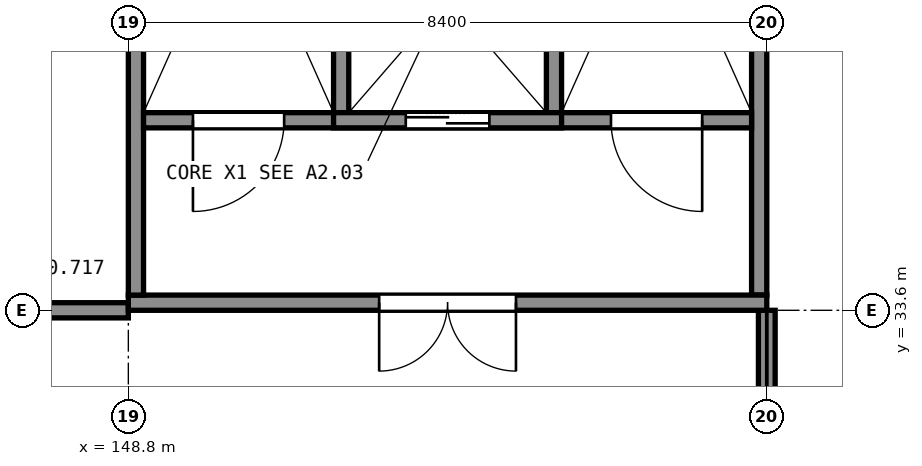
"""IFC4 building model, lengths in metres.
Left out: names, types, materials, properties, quantities, classifications, styles, units other than length and angle.
Written with IfcOpenShell. Run it as: python <this file> out.ifc"""

import sys

from ifc_helpers import new_model, si_unit, direction, frame, frame_2d, origin, place, context, subcontext, project, spatial, polyline, rectangle, outline, extrude, element, fill, save


model = new_model("IFC4")
c1 = context("Model", 3, precision=1e-05, world=origin(), true_north=direction((0.0, 1.0)))
c2 = subcontext(c1, "Body", "Model", "MODEL_VIEW")
j1 = project(units=[si_unit("LENGTHUNIT", "METRE"), si_unit("PLANEANGLEUNIT", "RADIAN")], contexts=[c1])
p1 = place(None, origin())
s1 = spatial("IfcSite", under=j1, at=p1, CompositionType="ELEMENT")
p2 = place(p1, origin())
s2 = spatial("IfcBuilding", under=s1, at=p2, CompositionType="ELEMENT")
p3 = place(p2, frame((0.0, 0.0, 25.0)))
s3 = spatial("IfcBuildingStorey", under=s2, at=p3, CompositionType="ELEMENT", Elevation=25.0)
p4 = place(p3, frame((148.8, 33.7, 0.0), z_axis=(0.0, 0.0, 1.0), x_axis=(1.0, 0.0, 0.0)))
e1 = element("IfcWall", 1, at=p4, inside=s3, PredefinedType="SHEAR", context=c2, shape_type="SweptSolid", body=[
    extrude(outline(polyline([(0.0, 0.0), (8.4, 0.0), (8.4, 4.4), (7.8, 4.528), (7.5, 4.591), (6.6, 4.783), (6.3, 4.846), (5.4, 5.038), (5.1, 5.101), (3.9, 5.357), (3.6, 5.42), (2.7, 5.612), (2.4, 5.675), (1.5, 5.867), (1.2, 5.93), (0.3, 6.122), (0.0, 6.185), (0.0, 0.0)])), frame((0.0, 0.1, 0.0), z_axis=(0.0, -1.0, 0.0), x_axis=(1.0, 0.0, 0.0)), (0.0, 0.0, 1.0), 0.2),
])
p5 = place(p4, frame((3.3, 0.0, 0.0)))
e2 = element("IfcOpeningElement", 2, at=p5, cuts=e1, PredefinedType="OPENING", context=c2, shape_type="SweptSolid", body=[
    extrude(rectangle(XDim=1.8, YDim=2.1, at=frame_2d((0.9, 1.05))), frame((0.0, 0.11, 0.0), z_axis=(0.0, -1.0, 0.0), x_axis=(1.0, 0.0, 0.0)), (0.0, 0.0, 1.0), 0.22),
])
p6 = place(p3, frame((148.9, 33.8, 0.0), z_axis=(0.0, 0.0, 1.0), x_axis=(0.0, 1.0, 0.0)))
e3 = element("IfcWall", 3, at=p6, inside=s3, PredefinedType="SHEAR", context=c2, shape_type="SweptSolid", body=[
    extrude(rectangle(XDim=8.0, YDim=0.2, at=frame_2d((4.0, 0.0))), origin(), (0.0, 0.0, 1.0), 6.165),
])
p7 = place(p3, frame((157.1, 33.8, 0.0), z_axis=(0.0, 0.0, 1.0), x_axis=(0.0, 1.0, 0.0)))
e4 = element("IfcWall", 4, at=p7, inside=s3, PredefinedType="SHEAR", context=c2, shape_type="SweptSolid", body=[
    extrude(rectangle(XDim=8.0, YDim=0.2, at=frame_2d((4.0, 0.0))), origin(), (0.0, 0.0, 1.0), 4.42),
])
p8 = place(p3, frame((149.0, 36.1, 0.0), z_axis=(0.0, 0.0, 1.0), x_axis=(1.0, 0.0, 0.0)))
e5 = element("IfcWall", 5, at=p8, inside=s3, PredefinedType="SHEAR", context=c2, shape_type="SweptSolid", body=[
    extrude(outline(polyline([(0.0, 0.0), (8.0, 0.0), (8.0, 4.443), (7.704, 4.505), (0.0, 6.143), (0.0, 0.0)])), frame((0.0, 0.1, 0.0), z_axis=(0.0, -1.0, 0.0), x_axis=(1.0, 0.0, 0.0)), (0.0, 0.0, 1.0), 0.2),
])
p9 = place(p8, frame((0.65, 0.0, 0.0)))
e6 = element("IfcOpeningElement", 6, at=p9, cuts=e5, PredefinedType="OPENING", context=c2, shape_type="SweptSolid", body=[
    extrude(rectangle(XDim=1.2, YDim=2.1, at=frame_2d((0.6, 1.05))), frame((0.0, 0.11, 0.0), z_axis=(0.0, -1.0, 0.0), x_axis=(1.0, 0.0, 0.0)), (0.0, 0.0, 1.0), 0.22),
])
p10 = place(p8, frame((6.15, 0.0, 0.0)))
e7 = element("IfcOpeningElement", 7, at=p10, cuts=e5, PredefinedType="OPENING", context=c2, shape_type="SweptSolid", body=[
    extrude(rectangle(XDim=1.2, YDim=2.1, at=frame_2d((0.6, 1.05))), frame((0.0, 0.11, 0.0), z_axis=(0.0, -1.0, 0.0), x_axis=(1.0, 0.0, 0.0)), (0.0, 0.0, 1.0), 0.22),
])
p11 = place(p8, frame((3.45, 0.0, 0.0)))
e8 = element("IfcOpeningElement", 8, at=p11, cuts=e5, PredefinedType="OPENING", context=c2, shape_type="SweptSolid", body=[
    extrude(rectangle(XDim=1.1, YDim=2.1, at=frame_2d((0.55, 1.05))), frame((0.0, 0.11, 0.0), z_axis=(0.0, -1.0, 0.0), x_axis=(1.0, 0.0, 0.0)), (0.0, 0.0, 1.0), 0.22),
])
p12 = place(p3, frame((151.6, 36.2, 0.0), z_axis=(0.0, 0.0, 1.0), x_axis=(0.0, 1.0, 0.0)))
e9 = element("IfcWall", 9, at=p12, inside=s3, PredefinedType="SHEAR", context=c2, shape_type="SweptSolid", body=[
    extrude(rectangle(XDim=5.6, YDim=0.2, at=frame_2d((2.8, 0.0))), origin(), (0.0, 0.0, 1.0), 5.59),
])
p13 = place(p3, frame((154.4, 36.2, 0.0), z_axis=(0.0, 0.0, 1.0), x_axis=(0.0, 1.0, 0.0)))
e10 = element("IfcWall", 10, at=p13, inside=s3, PredefinedType="SHEAR", context=c2, shape_type="SweptSolid", body=[
    extrude(rectangle(XDim=5.6, YDim=0.2, at=frame_2d((2.8, 0.0))), origin(), (0.0, 0.0, 1.0), 4.995),
])
p14 = place(p3, frame((151.5, 36.1, 4.975), z_axis=(0.0, 0.0, 1.0), x_axis=(1.0, 0.0, 0.0)))
e11 = element("IfcWall", 11, at=p14, inside=s3, PredefinedType="SOLIDWALL", context=c2, shape_type="SweptSolid", body=[
    extrude(outline(polyline([(0.0, 0.636), (3.0, -0.001), (3.0, 3.438), (0.0, 3.438), (0.0, 0.636)])), frame((0.0, 0.1, 0.0), z_axis=(0.0, -1.0, 0.0), x_axis=(1.0, 0.0, 0.0)), (0.0, 0.0, 1.0), 0.2),
])
p15 = place(p3, frame((157.2, 25.5, 0.0), z_axis=(0.0, 0.0, 1.0), x_axis=(0.0, 1.0, 0.0)))
e12 = element("IfcWall", 12, at=p15, inside=s3, PredefinedType="SOLIDWALL", context=c2, shape_type="SweptSolid", body=[
    extrude(rectangle(XDim=8.1, YDim=0.22, at=frame_2d((4.05, 0.0))), origin(), (0.0, 0.0, 1.0), 4.353),
])
p16 = place(p3, frame((144.5, 33.6, 0.0), z_axis=(0.0, 0.0, 1.0), x_axis=(1.0, 0.0, 0.0)))
e13 = element("IfcWall", 13, at=p16, inside=s3, PredefinedType="PARTITIONING", context=c2, shape_type="SweptSolid", body=[
    extrude(outline(polyline([(0.0, 0.0), (4.3, 0.0), (4.3, 5.717), (4.2, 5.717), (3.15, 5.93), (1.05, 6.376), (0.0, 6.568), (0.0, 0.0)])), frame((0.0, 0.1, 0.0), z_axis=(0.0, -1.0, 0.0), x_axis=(1.0, 0.0, 0.0)), (0.0, 0.0, 1.0), 0.2),
])
p17 = place(p16, frame((1.75, 0.0, 0.0)))
e14 = element("IfcOpeningElement", 14, at=p17, cuts=e13, PredefinedType="OPENING", context=c2, shape_type="SweptSolid", body=[
    extrude(rectangle(XDim=1.0, YDim=2.1, at=frame_2d((0.5, 1.05))), frame((0.0, 0.11, 0.0), z_axis=(0.0, -1.0, 0.0), x_axis=(1.0, 0.0, 0.0)), (0.0, 0.0, 1.0), 0.22),
])
p18 = place(p5, origin())
e15 = element("IfcDoor", 15, at=p18, inside=s3, OperationType="DOUBLE_DOOR_SINGLE_SWING", PredefinedType="DOOR", context=c2, shape_type="SweptSolid", body=[
    extrude(rectangle(XDim=1.8, YDim=2.1, at=frame_2d((0.9, 1.05))), frame((0.0, 0.025, 0.0), z_axis=(0.0, -1.0, 0.0), x_axis=(1.0, 0.0, 0.0)), (0.0, 0.0, 1.0), 0.05),
])
fill(e2, e15)
p19 = place(p9, origin())
e16 = element("IfcDoor", 16, at=p19, inside=s3, OperationType="SINGLE_SWING_LEFT", PredefinedType="DOOR", context=c2, shape_type="SweptSolid", body=[
    extrude(rectangle(XDim=1.2, YDim=2.1, at=frame_2d((0.6, 1.05))), frame((0.0, 0.025, 0.0), z_axis=(0.0, -1.0, 0.0), x_axis=(1.0, 0.0, 0.0)), (0.0, 0.0, 1.0), 0.05),
])
fill(e6, e16)
p20 = place(p10, origin())
e17 = element("IfcDoor", 17, at=p20, inside=s3, OperationType="SINGLE_SWING_RIGHT", PredefinedType="DOOR", context=c2, shape_type="SweptSolid", body=[
    extrude(rectangle(XDim=1.2, YDim=2.1, at=frame_2d((0.6, 1.05))), frame((0.0, 0.025, 0.0), z_axis=(0.0, -1.0, 0.0), x_axis=(1.0, 0.0, 0.0)), (0.0, 0.0, 1.0), 0.05),
])
fill(e7, e17)
p21 = place(p11, origin())
e18 = element("IfcDoor", 18, at=p21, inside=s3, OperationType="DOUBLE_DOOR_SLIDING", PredefinedType="DOOR", context=c2, shape_type="SweptSolid", body=[
    extrude(rectangle(XDim=1.1, YDim=2.1, at=frame_2d((0.55, 1.05))), frame((0.0, 0.025, 0.0), z_axis=(0.0, -1.0, 0.0), x_axis=(1.0, 0.0, 0.0)), (0.0, 0.0, 1.0), 0.05),
])
fill(e8, e18)
save(model, sys.argv[1])
